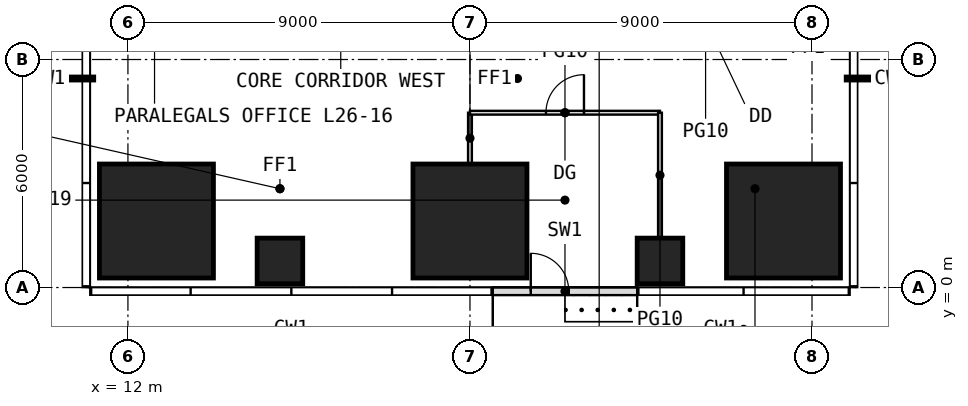
"""IFC4 building model, lengths in metres.
Left out: names, types, materials, properties, quantities, classifications, styles, units other than length and angle.
Written with IfcOpenShell. Run it as: python <this file> out.ifc"""

import sys

from ifc_helpers import new_model, si_unit, direction, frame, frame_2d, origin, origin_2d, place, context, subcontext, project, spatial, rectangle, extrude, element, fill, save


model = new_model("IFC4")
c1 = context("Model", 3, precision=1e-05, world=origin(), true_north=direction((0.0, 1.0)))
c2 = subcontext(c1, "Body", "Model", "MODEL_VIEW")
j1 = project(units=[si_unit("LENGTHUNIT", "METRE"), si_unit("PLANEANGLEUNIT", "RADIAN")], contexts=[c1])
p1 = place(None, origin())
s1 = spatial("IfcSite", under=j1, at=p1, CompositionType="ELEMENT")
p2 = place(p1, origin())
s2 = spatial("IfcBuilding", under=s1, at=p2, CompositionType="ELEMENT")
p3 = place(p2, frame((0.0, 0.0, 112.5)))
s3 = spatial("IfcBuildingStorey", under=s2, at=p3, CompositionType="ELEMENT", Elevation=112.5)
p4 = place(p3, frame((12.75, 1.75, 0.0), z_axis=(0.0, 0.0, 1.0), x_axis=(1.0, 0.0, 0.0)))
e1 = element("IfcColumn", 1, at=p4, inside=s3, PredefinedType="COLUMN", context=c2, shape_type="SweptSolid", body=[
    extrude(rectangle(XDim=3.0, YDim=3.0, at=origin_2d()), origin(), (0.0, 0.0, 1.0), 4.0),
])
p5 = place(p3, frame((16.0, 0.7, 0.0), z_axis=(0.0, 0.0, 1.0), x_axis=(1.0, 0.0, 0.0)))
e2 = element("IfcColumn", 2, at=p5, inside=s3, PredefinedType="COLUMN", context=c2, shape_type="SweptSolid", body=[
    extrude(rectangle(XDim=1.2, YDim=1.2, at=origin_2d()), origin(), (0.0, 0.0, 1.0), 4.0),
])
p6 = place(p3, frame((21.0, 1.75, 0.0), z_axis=(0.0, 0.0, 1.0), x_axis=(1.0, 0.0, 0.0)))
e3 = element("IfcColumn", 3, at=p6, inside=s3, PredefinedType="COLUMN", context=c2, shape_type="SweptSolid", body=[
    extrude(rectangle(XDim=3.0, YDim=3.0, at=origin_2d()), origin(), (0.0, 0.0, 1.0), 4.0),
])
p7 = place(p3, frame((26.0, 0.7, 0.0), z_axis=(0.0, 0.0, 1.0), x_axis=(1.0, 0.0, 0.0)))
e4 = element("IfcColumn", 4, at=p7, inside=s3, PredefinedType="COLUMN", context=c2, shape_type="SweptSolid", body=[
    extrude(rectangle(XDim=1.2, YDim=1.2, at=origin_2d()), origin(), (0.0, 0.0, 1.0), 4.0),
])
p8 = place(p3, frame((29.25, 1.75, 0.0), z_axis=(0.0, 0.0, 1.0), x_axis=(1.0, 0.0, 0.0)))
e5 = element("IfcColumn", 5, at=p8, inside=s3, PredefinedType="COLUMN", context=c2, shape_type="SweptSolid", body=[
    extrude(rectangle(XDim=3.0, YDim=3.0, at=origin_2d()), origin(), (0.0, 0.0, 1.0), 4.0),
])
p9 = place(p3, frame((21.6, -0.1, 0.0), z_axis=(0.0, 0.0, 1.0), x_axis=(1.0, 0.0, 0.0)))
e6 = element("IfcWall", 6, at=p9, inside=s3, PredefinedType="USERDEFINED", context=c2, shape_type="SweptSolid", body=[
    extrude(rectangle(XDim=3.8, YDim=0.2, at=frame_2d((1.9, 0.0))), origin(), (0.0, 0.0, 1.0), 3.75),
])
p10 = place(p9, frame((1.0, 0.0, 0.0)))
e7 = element("IfcOpeningElement", 7, at=p10, cuts=e6, PredefinedType="OPENING", context=c2, shape_type="SweptSolid", body=[
    extrude(rectangle(XDim=1.0, YDim=2.4, at=frame_2d((0.5, 1.2))), frame((0.0, 0.11, 0.0), z_axis=(0.0, -1.0, 0.0), x_axis=(1.0, 0.0, 0.0)), (0.0, 0.0, 1.0), 0.22),
])
p11 = place(p3, frame((21.0, 3.26, 0.0), z_axis=(0.0, 0.0, 1.0), x_axis=(0.0, 1.0, 0.0)))
e8 = element("IfcWall", 8, at=p11, inside=s3, PredefinedType="PARTITIONING", context=c2, shape_type="SweptSolid", body=[
    extrude(rectangle(XDim=1.34, YDim=0.1, at=frame_2d((0.67, 0.0))), origin(), (0.0, 0.0, 1.0), 3.75),
])
p12 = place(p3, frame((21.0, 4.6, 0.0), z_axis=(0.0, 0.0, 1.0), x_axis=(1.0, 0.0, 0.0)))
e9 = element("IfcWall", 9, at=p12, inside=s3, PredefinedType="PARTITIONING", context=c2, shape_type="SweptSolid", body=[
    extrude(rectangle(XDim=5.0, YDim=0.1, at=frame_2d((2.5, 0.0))), origin(), (0.0, 0.0, 1.0), 3.75),
])
p13 = place(p12, frame((2.0, 0.0, 0.0)))
e10 = element("IfcOpeningElement", 10, at=p13, cuts=e9, PredefinedType="OPENING", context=c2, shape_type="SweptSolid", body=[
    extrude(rectangle(XDim=1.0, YDim=2.4, at=frame_2d((0.5, 1.2))), frame((0.0, 0.06, 0.0), z_axis=(0.0, -1.0, 0.0), x_axis=(1.0, 0.0, 0.0)), (0.0, 0.0, 1.0), 0.12),
])
p14 = place(p3, frame((26.0, 1.31, 0.0), z_axis=(0.0, 0.0, 1.0), x_axis=(0.0, 1.0, 0.0)))
e11 = element("IfcWall", 11, at=p14, inside=s3, PredefinedType="PARTITIONING", context=c2, shape_type="SweptSolid", body=[
    extrude(rectangle(XDim=3.29, YDim=0.1, at=frame_2d((1.645, 0.0))), origin(), (0.0, 0.0, 1.0), 3.75),
])
p15 = place(p10, origin())
e12 = element("IfcDoor", 12, at=p15, inside=s3, OperationType="SINGLE_SWING_LEFT", PredefinedType="DOOR", context=c2, shape_type="SweptSolid", body=[
    extrude(rectangle(XDim=1.0, YDim=2.4, at=frame_2d((0.5, 1.2))), frame((0.0, 0.025, 0.0), z_axis=(0.0, -1.0, 0.0), x_axis=(1.0, 0.0, 0.0)), (0.0, 0.0, 1.0), 0.05),
])
fill(e7, e12)
p16 = place(p13, origin())
e13 = element("IfcDoor", 13, at=p16, inside=s3, OperationType="SINGLE_SWING_RIGHT", PredefinedType="DOOR", context=c2, shape_type="SweptSolid", body=[
    extrude(rectangle(XDim=1.0, YDim=2.4, at=frame_2d((0.5, 1.2))), frame((0.0, 0.025, 0.0), z_axis=(0.0, -1.0, 0.0), x_axis=(1.0, 0.0, 0.0)), (0.0, 0.0, 1.0), 0.05),
])
fill(e10, e13)
save(model, sys.argv[1])
